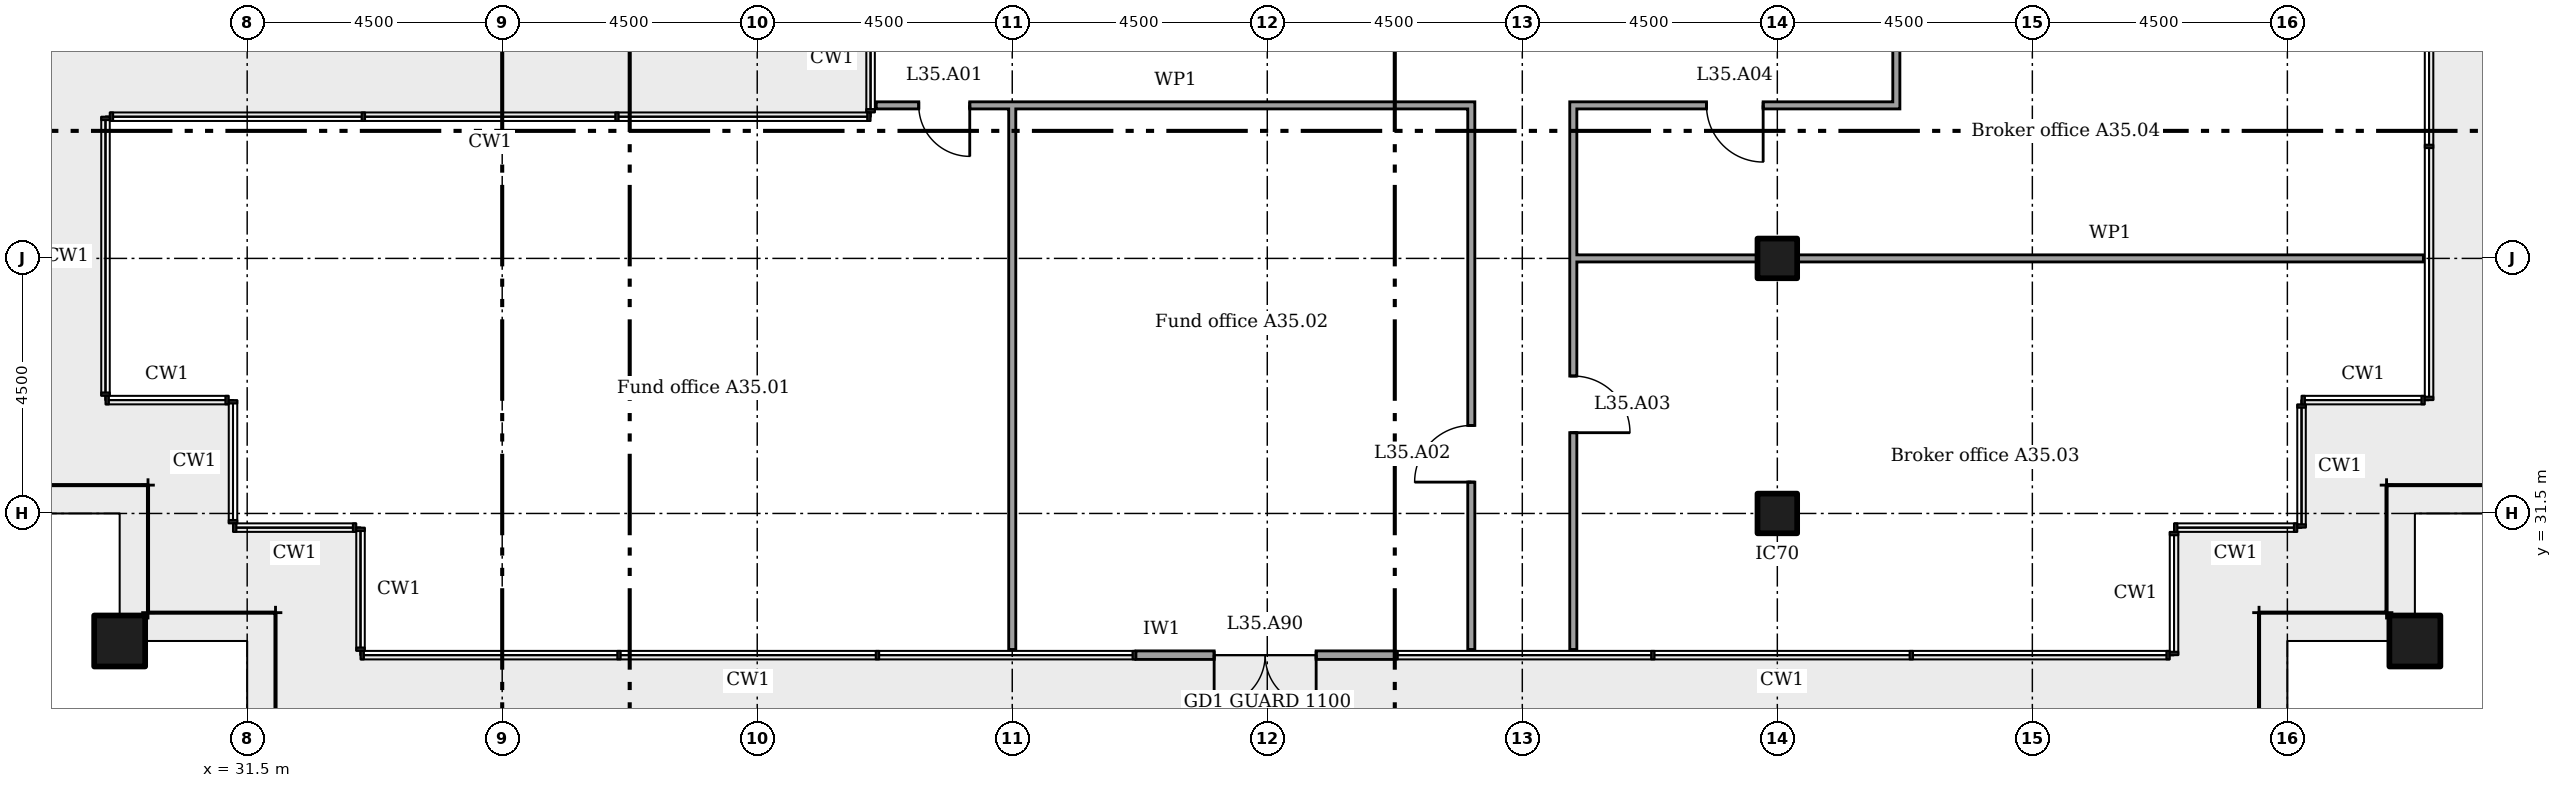
"""IFC4 building model, lengths in metres.
Left out: names, types, materials, properties, quantities, classifications, styles, units other than length and angle.
Written with IfcOpenShell. Run it as: python <this file> out.ifc"""

import sys

from ifc_helpers import new_model, si_unit, direction, frame, frame_2d, origin, origin_2d, place, context, subcontext, project, spatial, rectangle, extrude, element, fill, save


model = new_model("IFC4")
c1 = context("Model", 3, precision=1e-05, world=origin(), true_north=direction((0.0, 1.0)))
c2 = subcontext(c1, "Body", "Model", "MODEL_VIEW")
j1 = project(units=[si_unit("LENGTHUNIT", "METRE"), si_unit("PLANEANGLEUNIT", "RADIAN")], contexts=[c1])
p1 = place(None, origin())
s1 = spatial("IfcSite", under=j1, at=p1, CompositionType="ELEMENT")
p2 = place(p1, origin())
s2 = spatial("IfcBuilding", under=s1, at=p2, CompositionType="ELEMENT")
p3 = place(p2, frame((0.0, 0.0, 143.8)))
s3 = spatial("IfcBuildingStorey", under=s2, at=p3, CompositionType="ELEMENT", Elevation=143.8)
for number, where in (
    (1, (69.75, 29.25, 0.0)),
    (2, (29.25, 29.25, 0.0)),
):
    element("IfcColumn", number, at=place(p3, frame(where)), inside=s3, PredefinedType="COLUMN", context=c2, shape_type="SweptSolid", body=[
        extrude(rectangle(XDim=0.9, YDim=0.9, at=origin_2d()), origin(), (0.0, 0.0, 1.0), 3.6),
    ])
for number, where in (
    (3, (58.5, 31.5, 0.0)),
    (4, (58.5, 36.0, 0.0)),
):
    element("IfcColumn", number, at=place(p3, frame(where)), inside=s3, PredefinedType="COLUMN", context=c2, shape_type="SweptSolid", body=[
        extrude(rectangle(XDim=0.7, YDim=0.7, at=origin_2d()), origin(), (0.0, 0.0, 1.0), 3.6),
    ])
p4 = place(p3, frame((47.182, 29.0, 0.0)))
e5 = element("IfcWall", 5, at=p4, inside=s3, PredefinedType="SOLIDWALL", context=c2, shape_type="SweptSolid", body=[
    extrude(rectangle(XDim=4.561, YDim=0.15, at=frame_2d((2.28, 0.0))), origin(), (0.0, 0.0, 1.0), 3.45),
])
p5 = place(p4, frame((1.38, 0.0, 0.0)))
e6 = element("IfcOpeningElement", 6, at=p5, cuts=e5, PredefinedType="OPENING", context=c2, shape_type="SweptSolid", body=[
    extrude(rectangle(XDim=1.8, YDim=2.4, at=frame_2d((0.9, 1.2))), frame((0.0, 0.085, 0.0), z_axis=(0.0, -1.0, 0.0), x_axis=(1.0, 0.0, 0.0)), (0.0, 0.0, 1.0), 0.17),
])
p6 = place(p3, frame((54.9, 36.0, 0.0)))
e7 = element("IfcWall", 7, at=p6, inside=s3, PredefinedType="PARTITIONING", context=c2, shape_type="SweptSolid", body=[
    extrude(rectangle(XDim=3.25, YDim=0.125, at=frame_2d((1.625, 0.0))), origin(), (0.0, 0.0, 1.0), 3.45),
])
p7 = place(p3, frame((58.85, 36.0, 0.0)))
e8 = element("IfcWall", 8, at=p7, inside=s3, PredefinedType="PARTITIONING", context=c2, shape_type="SweptSolid", body=[
    extrude(rectangle(XDim=11.05, YDim=0.125, at=frame_2d((5.525, 0.0))), origin(), (0.0, 0.0, 1.0), 2.766),
])
p8 = place(p3, frame((42.6, 38.7, 0.0)))
e9 = element("IfcWall", 9, at=p8, inside=s3, PredefinedType="PARTITIONING", context=c2, shape_type="SweptSolid", body=[
    extrude(rectangle(XDim=10.562, YDim=0.125, at=frame_2d((5.281, 0.0))), origin(), (0.0, 0.0, 1.0), 3.45),
])
p9 = place(p8, frame((0.75, 0.0, 0.0)))
e10 = element("IfcOpeningElement", 10, at=p9, cuts=e9, PredefinedType="OPENING", context=c2, shape_type="SweptSolid", body=[
    extrude(rectangle(XDim=0.9, YDim=2.1, at=frame_2d((0.45, 1.05))), frame((0.0, 0.073, 0.0), z_axis=(0.0, -1.0, 0.0), x_axis=(1.0, 0.0, 0.0)), (0.0, 0.0, 1.0), 0.145),
])
p10 = place(p3, frame((54.837, 38.7, 0.0)))
e11 = element("IfcWall", 11, at=p10, inside=s3, PredefinedType="PARTITIONING", context=c2, shape_type="SweptSolid", body=[
    extrude(rectangle(XDim=5.825, YDim=0.125, at=frame_2d((2.913, 0.0))), origin(), (0.0, 0.0, 1.0), 3.45),
])
p11 = place(p10, frame((2.413, 0.0, 0.0)))
e12 = element("IfcOpeningElement", 12, at=p11, cuts=e11, PredefinedType="OPENING", context=c2, shape_type="SweptSolid", body=[
    extrude(rectangle(XDim=1.0, YDim=2.1, at=frame_2d((0.5, 1.05))), frame((0.0, 0.073, 0.0), z_axis=(0.0, -1.0, 0.0), x_axis=(1.0, 0.0, 0.0)), (0.0, 0.0, 1.0), 0.145),
])
p12 = place(p3, frame((45.0, 29.1, 0.0), z_axis=(0.0, 0.0, 1.0), x_axis=(0.0, 1.0, 0.0)))
e13 = element("IfcWall", 13, at=p12, inside=s3, PredefinedType="PARTITIONING", context=c2, shape_type="SweptSolid", body=[
    extrude(rectangle(XDim=9.6, YDim=0.125, at=frame_2d((4.8, 0.0))), origin(), (0.0, 0.0, 1.0), 2.766),
])
p13 = place(p3, frame((53.1, 29.1, 0.0), z_axis=(0.0, 0.0, 1.0), x_axis=(0.0, 1.0, 0.0)))
e14 = element("IfcWall", 14, at=p13, inside=s3, PredefinedType="PARTITIONING", context=c2, shape_type="SweptSolid", body=[
    extrude(rectangle(XDim=9.537, YDim=0.125, at=frame_2d((4.769, 0.0))), origin(), (0.0, 0.0, 1.0), 3.45),
])
p14 = place(p13, frame((2.953, 0.0, 0.0)))
e15 = element("IfcOpeningElement", 15, at=p14, cuts=e14, PredefinedType="OPENING", context=c2, shape_type="SweptSolid", body=[
    extrude(rectangle(XDim=1.0, YDim=2.1, at=frame_2d((0.5, 1.05))), frame((0.0, 0.073, 0.0), z_axis=(0.0, -1.0, 0.0), x_axis=(1.0, 0.0, 0.0)), (0.0, 0.0, 1.0), 0.145),
])
p15 = place(p3, frame((54.9, 29.1, 0.0), z_axis=(0.0, 0.0, 1.0), x_axis=(0.0, 1.0, 0.0)))
e16 = element("IfcWall", 16, at=p15, inside=s3, PredefinedType="PARTITIONING", context=c2, shape_type="SweptSolid", body=[
    extrude(rectangle(XDim=9.537, YDim=0.125, at=frame_2d((4.769, 0.0))), origin(), (0.0, 0.0, 1.0), 3.45),
])
p16 = place(p15, frame((3.825, 0.0, 0.0)))
e17 = element("IfcOpeningElement", 17, at=p16, cuts=e16, PredefinedType="OPENING", context=c2, shape_type="SweptSolid", body=[
    extrude(rectangle(XDim=1.0, YDim=2.1, at=frame_2d((0.5, 1.05))), frame((0.0, 0.073, 0.0), z_axis=(0.0, -1.0, 0.0), x_axis=(1.0, 0.0, 0.0)), (0.0, 0.0, 1.0), 0.145),
])
p17 = place(p3, frame((60.6, 38.762, 0.0), z_axis=(0.0, 0.0, 1.0), x_axis=(0.0, 1.0, 0.0)))
e18 = element("IfcWall", 18, at=p17, inside=s3, PredefinedType="PARTITIONING", context=c2, shape_type="SweptSolid", body=[
    extrude(rectangle(XDim=22.075, YDim=0.125, at=frame_2d((11.038, 0.0))), origin(), (0.0, 0.0, 1.0), 3.45),
])
p18 = place(p17, frame((3.032, 0.0, 0.0)))
e19 = element("IfcOpeningElement", 19, at=p18, cuts=e18, PredefinedType="OPENING", context=c2, shape_type="SweptSolid", body=[
    extrude(rectangle(XDim=1.0, YDim=2.1, at=frame_2d((0.5, 1.05))), frame((0.0, 0.073, 0.0), z_axis=(0.0, -1.0, 0.0), x_axis=(1.0, 0.0, 0.0)), (0.0, 0.0, 1.0), 0.145),
])
p19 = place(p17, frame((8.442, 0.0, 0.0)))
e20 = element("IfcOpeningElement", 20, at=p19, cuts=e18, PredefinedType="OPENING", context=c2, shape_type="SweptSolid", body=[
    extrude(rectangle(XDim=1.0, YDim=2.1, at=frame_2d((0.5, 1.05))), frame((0.0, 0.073, 0.0), z_axis=(0.0, -1.0, 0.0), x_axis=(1.0, 0.0, 0.0)), (0.0, 0.0, 1.0), 0.145),
])
p20 = place(p17, frame((12.488, 0.0, 0.0)))
e21 = element("IfcOpeningElement", 21, at=p20, cuts=e18, PredefinedType="OPENING", context=c2, shape_type="SweptSolid", body=[
    extrude(rectangle(XDim=1.0, YDim=2.1, at=frame_2d((0.5, 1.05))), frame((0.0, 0.073, 0.0), z_axis=(0.0, -1.0, 0.0), x_axis=(1.0, 0.0, 0.0)), (0.0, 0.0, 1.0), 0.145),
])
p21 = place(p17, frame((16.532, 0.0, 0.0)))
e22 = element("IfcOpeningElement", 22, at=p21, cuts=e18, PredefinedType="OPENING", context=c2, shape_type="SweptSolid", body=[
    extrude(rectangle(XDim=1.0, YDim=2.1, at=frame_2d((0.5, 1.05))), frame((0.0, 0.073, 0.0), z_axis=(0.0, -1.0, 0.0), x_axis=(1.0, 0.0, 0.0)), (0.0, 0.0, 1.0), 0.145),
])
p22 = place(p17, frame((20.663, 0.0, 0.0)))
e23 = element("IfcOpeningElement", 23, at=p22, cuts=e18, PredefinedType="OPENING", context=c2, shape_type="SweptSolid", body=[
    extrude(rectangle(XDim=0.9, YDim=2.1, at=frame_2d((0.45, 1.05))), frame((0.0, 0.073, 0.0), z_axis=(0.0, -1.0, 0.0), x_axis=(1.0, 0.0, 0.0)), (0.0, 0.0, 1.0), 0.145),
])
p23 = place(p5, frame((1.8, 0.0, 0.0), x_axis=(-1.0, 0.0, 0.0)))
e24 = element("IfcDoor", 24, at=p23, inside=s3, OperationType="DOUBLE_DOOR_DOUBLE_SWING", PredefinedType="NOTDEFINED", context=c2, shape_type="SweptSolid", body=[
    extrude(rectangle(XDim=1.8, YDim=2.4, at=frame_2d((0.9, 1.2))), frame((0.0, 0.025, 0.0), z_axis=(0.0, -1.0, 0.0), x_axis=(1.0, 0.0, 0.0)), (0.0, 0.0, 1.0), 0.05),
])
fill(e6, e24)
p24 = place(p9, frame((0.9, 0.0, 0.0), x_axis=(-1.0, 0.0, 0.0)))
e25 = element("IfcDoor", 25, at=p24, inside=s3, OperationType="SINGLE_SWING_RIGHT", PredefinedType="DOOR", context=c2, shape_type="SweptSolid", body=[
    extrude(rectangle(XDim=0.9, YDim=2.1, at=frame_2d((0.45, 1.05))), frame((0.0, 0.025, 0.0), z_axis=(0.0, -1.0, 0.0), x_axis=(1.0, 0.0, 0.0)), (0.0, 0.0, 1.0), 0.05),
])
fill(e10, e25)
p25 = place(p14, origin())
e26 = element("IfcDoor", 26, at=p25, inside=s3, OperationType="SINGLE_SWING_RIGHT", PredefinedType="DOOR", context=c2, shape_type="SweptSolid", body=[
    extrude(rectangle(XDim=1.0, YDim=2.1, at=frame_2d((0.5, 1.05))), frame((0.0, 0.025, 0.0), z_axis=(0.0, -1.0, 0.0), x_axis=(1.0, 0.0, 0.0)), (0.0, 0.0, 1.0), 0.05),
])
fill(e15, e26)
p26 = place(p16, frame((1.0, 0.0, 0.0), x_axis=(-1.0, 0.0, 0.0)))
e27 = element("IfcDoor", 27, at=p26, inside=s3, OperationType="SINGLE_SWING_LEFT", PredefinedType="DOOR", context=c2, shape_type="SweptSolid", body=[
    extrude(rectangle(XDim=1.0, YDim=2.1, at=frame_2d((0.5, 1.05))), frame((0.0, 0.025, 0.0), z_axis=(0.0, -1.0, 0.0), x_axis=(1.0, 0.0, 0.0)), (0.0, 0.0, 1.0), 0.05),
])
fill(e17, e27)
p27 = place(p11, frame((1.0, 0.0, 0.0), x_axis=(-1.0, 0.0, 0.0)))
e28 = element("IfcDoor", 28, at=p27, inside=s3, OperationType="SINGLE_SWING_RIGHT", PredefinedType="DOOR", context=c2, shape_type="SweptSolid", body=[
    extrude(rectangle(XDim=1.0, YDim=2.1, at=frame_2d((0.5, 1.05))), frame((0.0, 0.025, 0.0), z_axis=(0.0, -1.0, 0.0), x_axis=(1.0, 0.0, 0.0)), (0.0, 0.0, 1.0), 0.05),
])
fill(e12, e28)
save(model, sys.argv[1])
